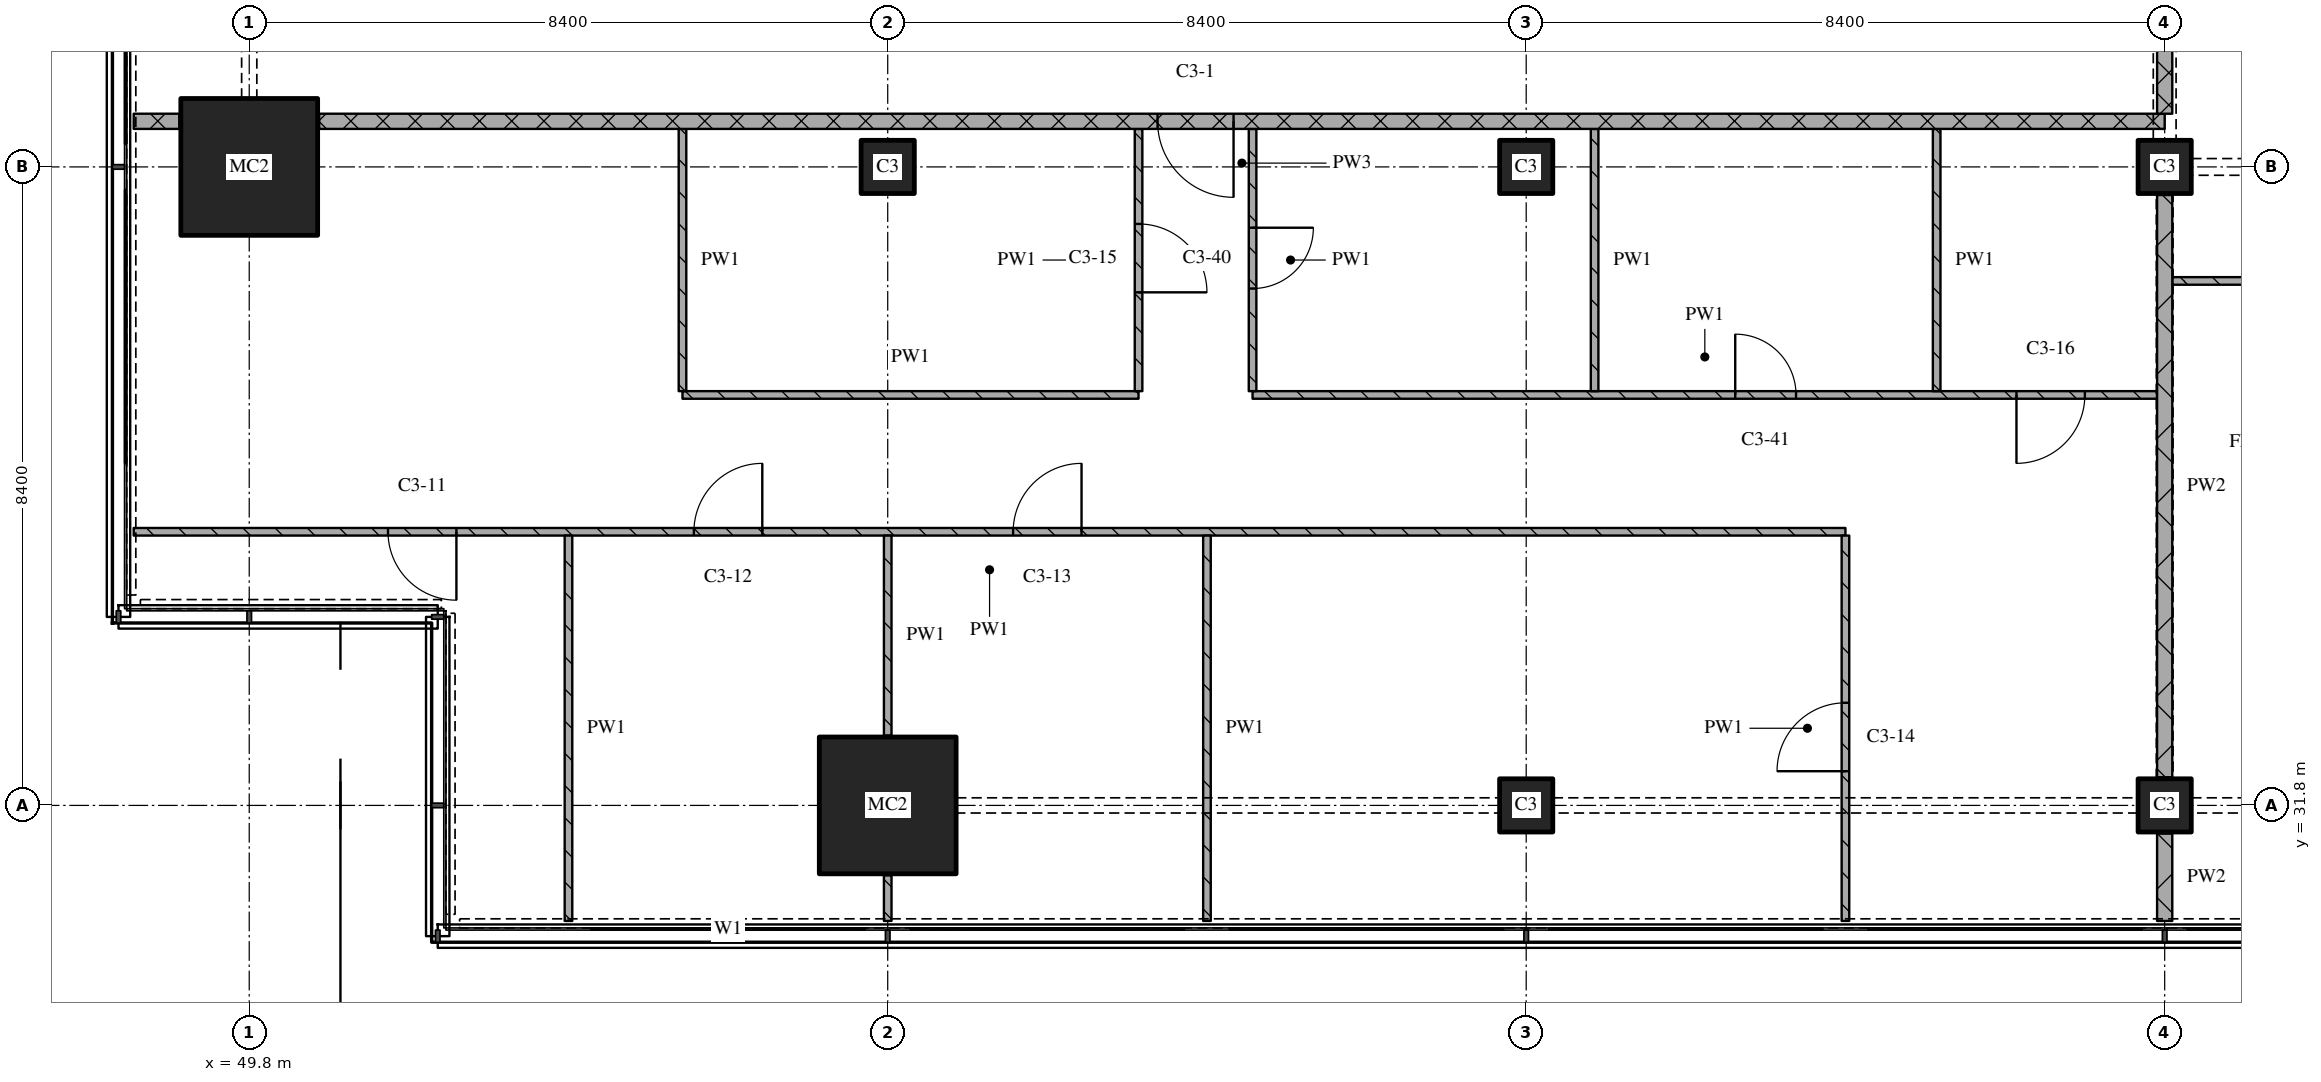
"""IFC4 building model, lengths in metres.
Left out: names, types, materials, properties, quantities, classifications, styles, units other than length and angle.
Written with IfcOpenShell. Run it as: python <this file> out.ifc"""

import sys

from ifc_helpers import new_model, si_unit, direction, frame, frame_2d, origin, origin_2d, place, context, subcontext, project, spatial, rectangle, extrude, element, fill, save


model = new_model("IFC4")
c1 = context("Model", 3, precision=1e-05, world=origin(), true_north=direction((0.0, 1.0)))
c2 = subcontext(c1, "Body", "Model", "MODEL_VIEW")
j1 = project(units=[si_unit("LENGTHUNIT", "METRE"), si_unit("PLANEANGLEUNIT", "RADIAN")], contexts=[c1])
p1 = place(None, origin())
s1 = spatial("IfcSite", under=j1, at=p1, CompositionType="ELEMENT")
p2 = place(p1, origin())
s2 = spatial("IfcBuilding", under=s1, at=p2, CompositionType="ELEMENT")
p3 = place(p2, frame((0.0, 0.0, 169.05)))
s3 = spatial("IfcBuildingStorey", under=s2, at=p3, CompositionType="ELEMENT", Elevation=169.05)
for number, where, z_axis, x_axis in (
    (1, (49.8, 40.2, 0.0), (0.0, 0.0, 1.0), (1.0, 0.0, 0.0)),
    (2, (58.2, 31.8, 0.0), (0.0, 0.0, 1.0), (1.0, 0.0, 0.0)),
):
    element("IfcColumn", number, at=place(p3, frame(where, z_axis=z_axis, x_axis=x_axis)), inside=s3, PredefinedType="COLUMN", context=c2, shape_type="SweptSolid", body=[
        extrude(rectangle(XDim=1.8, YDim=1.8, at=origin_2d()), origin(), (0.0, 0.0, 1.0), 3.6),
    ])
for number, where, z_axis, x_axis in (
    (3, (58.2, 40.2, 0.0), (0.0, 0.0, 1.0), (1.0, 0.0, 0.0)),
    (4, (66.6, 31.8, 0.0), (0.0, 0.0, 1.0), (1.0, 0.0, 0.0)),
    (5, (66.6, 40.2, 0.0), (0.0, 0.0, 1.0), (1.0, 0.0, 0.0)),
    (6, (75.0, 31.8, 0.0), (0.0, 0.0, 1.0), (1.0, 0.0, 0.0)),
    (7, (75.0, 40.2, 0.0), (0.0, 0.0, 1.0), (1.0, 0.0, 0.0)),
):
    element("IfcColumn", number, at=place(p3, frame(where, z_axis=z_axis, x_axis=x_axis)), inside=s3, PredefinedType="COLUMN", context=c2, shape_type="SweptSolid", body=[
        extrude(rectangle(XDim=0.7, YDim=0.7, at=origin_2d()), origin(), (0.0, 0.0, 1.0), 3.6),
    ])
p4 = place(p3, frame((70.8, 35.4, 0.0), z_axis=(0.0, 0.0, 1.0), x_axis=(-1.0, 0.0, 0.0)))
e8 = element("IfcWall", 8, at=p4, inside=s3, PredefinedType="PARTITIONING", context=c2, shape_type="SweptSolid", body=[
    extrude(rectangle(XDim=22.52, YDim=0.1, at=frame_2d((11.26, 0.0))), origin(), (0.0, 0.0, 1.0), 3.32),
])
p5 = place(p4, frame((10.05, 0.0, 0.0)))
e9 = element("IfcOpeningElement", 9, at=p5, cuts=e8, PredefinedType="OPENING", context=c2, shape_type="SweptSolid", body=[
    extrude(rectangle(XDim=0.9, YDim=2.1, at=frame_2d((0.45, 1.05))), frame((0.0, 0.06, 0.0), z_axis=(0.0, -1.0, 0.0), x_axis=(1.0, 0.0, 0.0)), (0.0, 0.0, 1.0), 0.12),
])
p6 = place(p4, frame((14.25, 0.0, 0.0)))
e10 = element("IfcOpeningElement", 10, at=p6, cuts=e8, PredefinedType="OPENING", context=c2, shape_type="SweptSolid", body=[
    extrude(rectangle(XDim=0.9, YDim=2.1, at=frame_2d((0.45, 1.05))), frame((0.0, 0.06, 0.0), z_axis=(0.0, -1.0, 0.0), x_axis=(1.0, 0.0, 0.0)), (0.0, 0.0, 1.0), 0.12),
])
p7 = place(p4, frame((18.274, 0.0, 0.0)))
e11 = element("IfcOpeningElement", 11, at=p7, cuts=e8, PredefinedType="OPENING", context=c2, shape_type="SweptSolid", body=[
    extrude(rectangle(XDim=0.9, YDim=2.1, at=frame_2d((0.45, 1.05))), frame((0.0, 0.06, 0.0), z_axis=(0.0, -1.0, 0.0), x_axis=(1.0, 0.0, 0.0)), (0.0, 0.0, 1.0), 0.12),
])
p8 = place(p3, frame((55.5, 37.2, 0.0), z_axis=(0.0, 0.0, 1.0), x_axis=(1.0, 0.0, 0.0)))
e12 = element("IfcWall", 12, at=p8, inside=s3, PredefinedType="PARTITIONING", context=c2, shape_type="SweptSolid", body=[
    extrude(rectangle(XDim=6.0, YDim=0.1, at=frame_2d((3.0, 0.0))), origin(), (0.0, 0.0, 1.0), 3.32),
])
p9 = place(p3, frame((63.0, 37.2, 0.0), z_axis=(0.0, 0.0, 1.0), x_axis=(1.0, 0.0, 0.0)))
e13 = element("IfcWall", 13, at=p9, inside=s3, PredefinedType="PARTITIONING", context=c2, shape_type="SweptSolid", body=[
    extrude(rectangle(XDim=11.9, YDim=0.1, at=frame_2d((5.95, 0.0))), origin(), (0.0, 0.0, 1.0), 3.32),
])
p10 = place(p9, frame((6.35, 0.0, 0.0)))
e14 = element("IfcOpeningElement", 14, at=p10, cuts=e13, PredefinedType="OPENING", context=c2, shape_type="SweptSolid", body=[
    extrude(rectangle(XDim=0.8, YDim=2.1, at=frame_2d((0.4, 1.05))), frame((0.0, 0.06, 0.0), z_axis=(0.0, -1.0, 0.0), x_axis=(1.0, 0.0, 0.0)), (0.0, 0.0, 1.0), 0.12),
])
p11 = place(p9, frame((10.05, 0.0, 0.0)))
e15 = element("IfcOpeningElement", 15, at=p11, cuts=e13, PredefinedType="OPENING", context=c2, shape_type="SweptSolid", body=[
    extrude(rectangle(XDim=0.9, YDim=2.1, at=frame_2d((0.45, 1.05))), frame((0.0, 0.06, 0.0), z_axis=(0.0, -1.0, 0.0), x_axis=(1.0, 0.0, 0.0)), (0.0, 0.0, 1.0), 0.12),
])
p12 = place(p3, frame((75.1, 38.7, 0.0), z_axis=(0.0, 0.0, 1.0), x_axis=(1.0, 0.0, 0.0)))
e16 = element("IfcWall", 16, at=p12, inside=s3, PredefinedType="PARTITIONING", context=c2, shape_type="SweptSolid", body=[
    extrude(rectangle(XDim=6.8, YDim=0.1, at=frame_2d((3.4, 0.0))), origin(), (0.0, 0.0, 1.0), 3.32),
])
p13 = place(p12, frame((1.75, 0.0, 0.0)))
e17 = element("IfcOpeningElement", 17, at=p13, cuts=e16, PredefinedType="OPENING", context=c2, shape_type="SweptSolid", body=[
    extrude(rectangle(XDim=0.8, YDim=2.1, at=frame_2d((0.4, 1.05))), frame((0.0, 0.06, 0.0), z_axis=(0.0, -1.0, 0.0), x_axis=(1.0, 0.0, 0.0)), (0.0, 0.0, 1.0), 0.12),
])
p14 = place(p12, frame((5.2, 0.0, 0.0)))
e18 = element("IfcOpeningElement", 18, at=p14, cuts=e16, PredefinedType="OPENING", context=c2, shape_type="SweptSolid", body=[
    extrude(rectangle(XDim=0.8, YDim=2.1, at=frame_2d((0.4, 1.05))), frame((0.0, 0.06, 0.0), z_axis=(0.0, -1.0, 0.0), x_axis=(1.0, 0.0, 0.0)), (0.0, 0.0, 1.0), 0.12),
])
p15 = place(p3, frame((48.28, 40.8, 0.0), z_axis=(0.0, 0.0, 1.0), x_axis=(1.0, 0.0, 0.0)))
e19 = element("IfcWall", 19, at=p15, inside=s3, PredefinedType="PARTITIONING", context=c2, shape_type="SweptSolid", body=[
    extrude(rectangle(XDim=0.6, YDim=0.2, at=frame_2d((0.3, 0.0))), origin(), (0.0, 0.0, 1.0), 3.32),
])
p16 = place(p3, frame((75.0, 40.8, 0.0), z_axis=(0.0, 0.0, 1.0), x_axis=(-1.0, 0.0, 0.0)))
e20 = element("IfcWall", 20, at=p16, inside=s3, PredefinedType="PARTITIONING", context=c2, shape_type="SweptSolid", body=[
    extrude(rectangle(XDim=24.28, YDim=0.2, at=frame_2d((12.14, 0.0))), origin(), (0.0, 0.0, 1.0), 3.32),
])
p17 = place(p16, frame((12.25, 0.0, 0.0)))
e21 = element("IfcOpeningElement", 21, at=p17, cuts=e20, PredefinedType="OPENING", context=c2, shape_type="SweptSolid", body=[
    extrude(rectangle(XDim=1.0, YDim=2.1, at=frame_2d((0.5, 1.05))), frame((0.0, 0.11, 0.0), z_axis=(0.0, -1.0, 0.0), x_axis=(1.0, 0.0, 0.0)), (0.0, 0.0, 1.0), 0.22),
])
p18 = place(p3, frame((54.0, 35.35, 0.0), z_axis=(0.0, 0.0, 1.0), x_axis=(0.0, -1.0, 0.0)))
e22 = element("IfcWall", 22, at=p18, inside=s3, PredefinedType="PARTITIONING", context=c2, shape_type="SweptSolid", body=[
    extrude(rectangle(XDim=5.07, YDim=0.1, at=frame_2d((2.535, 0.0))), origin(), (0.0, 0.0, 1.0), 3.32),
])
p19 = place(p3, frame((55.5, 40.7, 0.0), z_axis=(0.0, 0.0, 1.0), x_axis=(0.0, -1.0, 0.0)))
e23 = element("IfcWall", 23, at=p19, inside=s3, PredefinedType="PARTITIONING", context=c2, shape_type="SweptSolid", body=[
    extrude(rectangle(XDim=3.45, YDim=0.1, at=frame_2d((1.725, 0.0))), origin(), (0.0, 0.0, 1.0), 3.32),
])
p20 = place(p3, frame((58.2, 30.88, 0.0), z_axis=(0.0, 0.0, 1.0), x_axis=(0.0, -1.0, 0.0)))
e24 = element("IfcWall", 24, at=p20, inside=s3, PredefinedType="PARTITIONING", context=c2, shape_type="SweptSolid", body=[
    extrude(rectangle(XDim=0.6, YDim=0.1, at=frame_2d((0.3, 0.0))), origin(), (0.0, 0.0, 1.0), 3.32),
])
p21 = place(p3, frame((58.2, 35.35, 0.0), z_axis=(0.0, 0.0, 1.0), x_axis=(0.0, -1.0, 0.0)))
e25 = element("IfcWall", 25, at=p21, inside=s3, PredefinedType="PARTITIONING", context=c2, shape_type="SweptSolid", body=[
    extrude(rectangle(XDim=2.63, YDim=0.1, at=frame_2d((1.315, 0.0))), origin(), (0.0, 0.0, 1.0), 3.32),
])
p22 = place(p3, frame((61.5, 37.25, 0.0), z_axis=(0.0, 0.0, 1.0), x_axis=(0.0, 1.0, 0.0)))
e26 = element("IfcWall", 26, at=p22, inside=s3, PredefinedType="PARTITIONING", context=c2, shape_type="SweptSolid", body=[
    extrude(rectangle(XDim=3.45, YDim=0.1, at=frame_2d((1.725, 0.0))), origin(), (0.0, 0.0, 1.0), 3.32),
])
p23 = place(p22, frame((1.3, 0.0, 0.0)))
e27 = element("IfcOpeningElement", 27, at=p23, cuts=e26, PredefinedType="OPENING", context=c2, shape_type="SweptSolid", body=[
    extrude(rectangle(XDim=0.9, YDim=2.1, at=frame_2d((0.45, 1.05))), frame((0.0, 0.06, 0.0), z_axis=(0.0, -1.0, 0.0), x_axis=(1.0, 0.0, 0.0)), (0.0, 0.0, 1.0), 0.12),
])
p24 = place(p3, frame((62.4, 35.35, 0.0), z_axis=(0.0, 0.0, 1.0), x_axis=(0.0, -1.0, 0.0)))
e28 = element("IfcWall", 28, at=p24, inside=s3, PredefinedType="PARTITIONING", context=c2, shape_type="SweptSolid", body=[
    extrude(rectangle(XDim=5.07, YDim=0.1, at=frame_2d((2.535, 0.0))), origin(), (0.0, 0.0, 1.0), 3.32),
])
p25 = place(p3, frame((63.0, 40.7, 0.0), z_axis=(0.0, 0.0, 1.0), x_axis=(0.0, -1.0, 0.0)))
e29 = element("IfcWall", 29, at=p25, inside=s3, PredefinedType="PARTITIONING", context=c2, shape_type="SweptSolid", body=[
    extrude(rectangle(XDim=3.45, YDim=0.1, at=frame_2d((1.725, 0.0))), origin(), (0.0, 0.0, 1.0), 3.32),
])
p26 = place(p25, frame((1.3, 0.0, 0.0)))
e30 = element("IfcOpeningElement", 30, at=p26, cuts=e29, PredefinedType="OPENING", context=c2, shape_type="SweptSolid", body=[
    extrude(rectangle(XDim=0.8, YDim=2.1, at=frame_2d((0.4, 1.05))), frame((0.0, 0.06, 0.0), z_axis=(0.0, -1.0, 0.0), x_axis=(1.0, 0.0, 0.0)), (0.0, 0.0, 1.0), 0.12),
])
p27 = place(p3, frame((67.5, 40.7, 0.0), z_axis=(0.0, 0.0, 1.0), x_axis=(0.0, -1.0, 0.0)))
e31 = element("IfcWall", 31, at=p27, inside=s3, PredefinedType="PARTITIONING", context=c2, shape_type="SweptSolid", body=[
    extrude(rectangle(XDim=3.45, YDim=0.1, at=frame_2d((1.725, 0.0))), origin(), (0.0, 0.0, 1.0), 3.32),
])
p28 = place(p3, frame((70.8, 30.28, 0.0), z_axis=(0.0, 0.0, 1.0), x_axis=(0.0, 1.0, 0.0)))
e32 = element("IfcWall", 32, at=p28, inside=s3, PredefinedType="PARTITIONING", context=c2, shape_type="SweptSolid", body=[
    extrude(rectangle(XDim=5.07, YDim=0.1, at=frame_2d((2.535, 0.0))), origin(), (0.0, 0.0, 1.0), 3.32),
])
p29 = place(p28, frame((1.97, 0.0, 0.0)))
e33 = element("IfcOpeningElement", 33, at=p29, cuts=e32, PredefinedType="OPENING", context=c2, shape_type="SweptSolid", body=[
    extrude(rectangle(XDim=0.9, YDim=2.1, at=frame_2d((0.45, 1.05))), frame((0.0, 0.06, 0.0), z_axis=(0.0, -1.0, 0.0), x_axis=(1.0, 0.0, 0.0)), (0.0, 0.0, 1.0), 0.12),
])
p30 = place(p3, frame((72.0, 40.7, 0.0), z_axis=(0.0, 0.0, 1.0), x_axis=(0.0, -1.0, 0.0)))
e34 = element("IfcWall", 34, at=p30, inside=s3, PredefinedType="PARTITIONING", context=c2, shape_type="SweptSolid", body=[
    extrude(rectangle(XDim=3.45, YDim=0.1, at=frame_2d((1.725, 0.0))), origin(), (0.0, 0.0, 1.0), 3.32),
])
p31 = place(p3, frame((75.0, 43.1, 0.0), z_axis=(0.0, 0.0, 1.0), x_axis=(0.0, -1.0, 0.0)))
e35 = element("IfcWall", 35, at=p31, inside=s3, PredefinedType="PARTITIONING", context=c2, shape_type="SweptSolid", body=[
    extrude(rectangle(XDim=2.2, YDim=0.2, at=frame_2d((1.1, 0.0))), origin(), (0.0, 0.0, 1.0), 2.43),
])
p32 = place(p3, frame((75.0, 31.43, 0.0), z_axis=(0.0, 0.0, 1.0), x_axis=(0.0, -1.0, 0.0)))
e36 = element("IfcWall", 36, at=p32, inside=s3, PredefinedType="PARTITIONING", context=c2, shape_type="SweptSolid", body=[
    extrude(rectangle(XDim=1.15, YDim=0.2, at=frame_2d((0.575, 0.0))), origin(), (0.0, 0.0, 1.0), 3.32),
])
p33 = place(p3, frame((75.0, 39.83, 0.0), z_axis=(0.0, 0.0, 1.0), x_axis=(0.0, -1.0, 0.0)))
e37 = element("IfcWall", 37, at=p33, inside=s3, PredefinedType="PARTITIONING", context=c2, shape_type="SweptSolid", body=[
    extrude(rectangle(XDim=7.66, YDim=0.2, at=frame_2d((3.83, 0.0))), origin(), (0.0, 0.0, 1.0), 2.72),
])
p34 = place(p5, origin())
e38 = element("IfcDoor", 38, at=p34, inside=s3, OperationType="SINGLE_SWING_RIGHT", PredefinedType="DOOR", context=c2, shape_type="SweptSolid", body=[
    extrude(rectangle(XDim=0.9, YDim=2.1, at=frame_2d((0.45, 1.05))), frame((0.0, 0.025, 0.0), z_axis=(0.0, -1.0, 0.0), x_axis=(1.0, 0.0, 0.0)), (0.0, 0.0, 1.0), 0.05),
])
fill(e9, e38)
p35 = place(p6, origin())
e39 = element("IfcDoor", 39, at=p35, inside=s3, OperationType="SINGLE_SWING_RIGHT", PredefinedType="DOOR", context=c2, shape_type="SweptSolid", body=[
    extrude(rectangle(XDim=0.9, YDim=2.1, at=frame_2d((0.45, 1.05))), frame((0.0, 0.025, 0.0), z_axis=(0.0, -1.0, 0.0), x_axis=(1.0, 0.0, 0.0)), (0.0, 0.0, 1.0), 0.05),
])
fill(e10, e39)
p36 = place(p7, origin())
e40 = element("IfcDoor", 40, at=p36, inside=s3, OperationType="SINGLE_SWING_LEFT", PredefinedType="DOOR", context=c2, shape_type="SweptSolid", body=[
    extrude(rectangle(XDim=0.9, YDim=2.1, at=frame_2d((0.45, 1.05))), frame((0.0, 0.025, 0.0), z_axis=(0.0, -1.0, 0.0), x_axis=(1.0, 0.0, 0.0)), (0.0, 0.0, 1.0), 0.05),
])
fill(e11, e40)
p37 = place(p10, origin())
e41 = element("IfcDoor", 41, at=p37, inside=s3, OperationType="SINGLE_SWING_LEFT", PredefinedType="DOOR", context=c2, shape_type="SweptSolid", body=[
    extrude(rectangle(XDim=0.8, YDim=2.1, at=frame_2d((0.4, 1.05))), frame((0.0, 0.025, 0.0), z_axis=(0.0, -1.0, 0.0), x_axis=(1.0, 0.0, 0.0)), (0.0, 0.0, 1.0), 0.05),
])
fill(e14, e41)
p38 = place(p11, origin())
e42 = element("IfcDoor", 42, at=p38, inside=s3, OperationType="SINGLE_SWING_RIGHT", PredefinedType="DOOR", context=c2, shape_type="SweptSolid", body=[
    extrude(rectangle(XDim=0.9, YDim=2.1, at=frame_2d((0.45, 1.05))), frame((0.0, 0.025, 0.0), z_axis=(0.0, -1.0, 0.0), x_axis=(1.0, 0.0, 0.0)), (0.0, 0.0, 1.0), 0.05),
])
fill(e15, e42)
p39 = place(p17, origin())
e43 = element("IfcDoor", 43, at=p39, inside=s3, OperationType="SINGLE_SWING_LEFT", PredefinedType="DOOR", context=c2, shape_type="SweptSolid", body=[
    extrude(rectangle(XDim=1.0, YDim=2.1, at=frame_2d((0.5, 1.05))), frame((0.0, 0.025, 0.0), z_axis=(0.0, -1.0, 0.0), x_axis=(1.0, 0.0, 0.0)), (0.0, 0.0, 1.0), 0.05),
])
fill(e21, e43)
p40 = place(p23, origin())
e44 = element("IfcDoor", 44, at=p40, inside=s3, OperationType="SINGLE_SWING_RIGHT", PredefinedType="DOOR", context=c2, shape_type="SweptSolid", body=[
    extrude(rectangle(XDim=0.9, YDim=2.1, at=frame_2d((0.45, 1.05))), frame((0.0, 0.025, 0.0), z_axis=(0.0, -1.0, 0.0), x_axis=(1.0, 0.0, 0.0)), (0.0, 0.0, 1.0), 0.05),
])
fill(e27, e44)
p41 = place(p26, origin())
e45 = element("IfcDoor", 45, at=p41, inside=s3, OperationType="SINGLE_SWING_LEFT", PredefinedType="DOOR", context=c2, shape_type="SweptSolid", body=[
    extrude(rectangle(XDim=0.8, YDim=2.1, at=frame_2d((0.4, 1.05))), frame((0.0, 0.025, 0.0), z_axis=(0.0, -1.0, 0.0), x_axis=(1.0, 0.0, 0.0)), (0.0, 0.0, 1.0), 0.05),
])
fill(e30, e45)
p42 = place(p29, origin())
e46 = element("IfcDoor", 46, at=p42, inside=s3, OperationType="SINGLE_SWING_LEFT", PredefinedType="DOOR", context=c2, shape_type="SweptSolid", body=[
    extrude(rectangle(XDim=0.9, YDim=2.1, at=frame_2d((0.45, 1.05))), frame((0.0, 0.025, 0.0), z_axis=(0.0, -1.0, 0.0), x_axis=(1.0, 0.0, 0.0)), (0.0, 0.0, 1.0), 0.05),
])
fill(e33, e46)
save(model, sys.argv[1])
